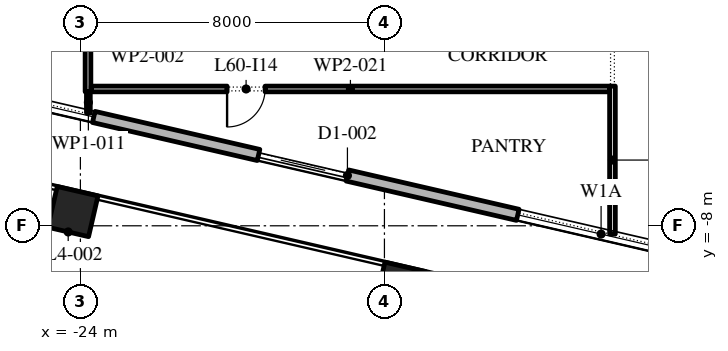
"""IFC4 building model, lengths in metres.
Left out: names, types, materials, properties, quantities, classifications, styles, units other than length and angle.
Written with IfcOpenShell. Run it as: python <this file> out.ifc"""

import sys

from ifc_helpers import new_model, si_unit, direction, frame, frame_2d, origin, origin_2d, place, context, subcontext, project, spatial, rectangle, extrude, element, fill, save


model = new_model("IFC4")
c1 = context("Model", 3, precision=1e-05, world=origin(), true_north=direction((0.0, 1.0)))
c2 = subcontext(c1, "Body", "Model", "MODEL_VIEW")
j1 = project(units=[si_unit("LENGTHUNIT", "METRE"), si_unit("PLANEANGLEUNIT", "RADIAN")], contexts=[c1])
p1 = place(None, origin())
s1 = spatial("IfcSite", under=j1, at=p1, CompositionType="ELEMENT")
p2 = place(p1, origin())
s2 = spatial("IfcBuilding", under=s1, at=p2, CompositionType="ELEMENT")
p3 = place(p2, frame((0.0, 0.0, 276.6)))
s3 = spatial("IfcBuildingStorey", under=s2, at=p3, CompositionType="ELEMENT", Elevation=276.6)
for number, where, z_axis, x_axis in (
    (1, (-24.197, -7.626, 0.0), (0.0, 0.0, 1.0), (0.974, -0.225, 0.0)),
    (2, (-15.574, -9.617, 0.0), (0.0, 0.0, 1.0), (0.974, -0.225, 0.0)),
):
    element("IfcColumn", number, at=place(p3, frame(where, z_axis=z_axis, x_axis=x_axis)), inside=s3, PredefinedType="COLUMN", context=c2, shape_type="SweptSolid", body=[
        extrude(rectangle(XDim=1.1, YDim=1.1, at=origin_2d()), origin(), (0.0, 0.0, 1.0), 4.2),
    ])
p4 = place(p3, frame((-29.616, -3.758, 0.0), z_axis=(0.0, 0.0, 1.0), x_axis=(0.974370532314, -0.224949029246, 0.0)))
e3 = element("IfcWall", 3, at=p4, inside=s3, PredefinedType="STANDARD", context=c2, shape_type="SweptSolid", body=[
    extrude(rectangle(XDim=48.0, YDim=0.3, at=frame_2d((24.0, 0.0))), origin(), (0.0, 0.0, 1.0), 4.0),
])
p5 = place(p4, frame((1.625, 0.0, 0.45)))
e4 = element("IfcOpeningElement", 4, at=p5, cuts=e3, PredefinedType="OPENING", context=c2, shape_type="SweptSolid", body=[
    extrude(rectangle(XDim=4.5, YDim=3.05, at=frame_2d((2.25, 1.525))), frame((0.0, 0.16, 0.0), z_axis=(0.0, -1.0, 0.0), x_axis=(1.0, 0.0, 0.0)), (0.0, 0.0, 1.0), 0.32),
])
p6 = place(p4, frame((10.575, 0.0, 0.0)))
e5 = element("IfcOpeningElement", 5, at=p6, cuts=e3, PredefinedType="OPENING", context=c2, shape_type="SweptSolid", body=[
    extrude(rectangle(XDim=2.4, YDim=3.5, at=frame_2d((1.2, 1.75))), frame((0.0, 0.16, 0.0), z_axis=(0.0, -1.0, 0.0), x_axis=(1.0, 0.0, 0.0)), (0.0, 0.0, 1.0), 0.32),
])
p7 = place(p4, frame((17.575, 0.0, 0.45)))
e6 = element("IfcOpeningElement", 6, at=p7, cuts=e3, PredefinedType="OPENING", context=c2, shape_type="SweptSolid", body=[
    extrude(rectangle(XDim=4.5, YDim=3.0, at=frame_2d((2.25, 1.5))), frame((0.0, 0.16, 0.0), z_axis=(0.0, -1.0, 0.0), x_axis=(1.0, 0.0, 0.0)), (0.0, 0.0, 1.0), 0.32),
])
p8 = place(p4, frame((25.625, 0.0, 0.45)))
e7 = element("IfcOpeningElement", 7, at=p8, cuts=e3, PredefinedType="OPENING", context=c2, shape_type="SweptSolid", body=[
    extrude(rectangle(XDim=4.5, YDim=2.95, at=frame_2d((2.25, 1.475))), frame((0.0, 0.16, 0.0), z_axis=(0.0, -1.0, 0.0), x_axis=(1.0, 0.0, 0.0)), (0.0, 0.0, 1.0), 0.32),
])
p9 = place(p4, frame((33.675, 0.0, 0.45)))
e8 = element("IfcOpeningElement", 8, at=p9, cuts=e3, PredefinedType="OPENING", context=c2, shape_type="SweptSolid", body=[
    extrude(rectangle(XDim=4.5, YDim=2.825, at=frame_2d((2.25, 1.413))), frame((0.0, 0.16, 0.0), z_axis=(0.0, -1.0, 0.0), x_axis=(1.0, 0.0, 0.0)), (0.0, 0.0, 1.0), 0.32),
])
p10 = place(p4, frame((42.175, 0.0, 0.0)))
e9 = element("IfcOpeningElement", 9, at=p10, cuts=e3, PredefinedType="OPENING", context=c2, shape_type="SweptSolid", body=[
    extrude(rectangle(XDim=2.4, YDim=3.5, at=frame_2d((1.2, 1.75))), frame((0.0, 0.16, 0.0), z_axis=(0.0, -1.0, 0.0), x_axis=(1.0, 0.0, 0.0)), (0.0, 0.0, 1.0), 0.32),
])
p11 = place(p3, frame((-23.8, -4.475, 0.0), z_axis=(0.0, 0.0, 1.0), x_axis=(0.0, 1.0, 0.0)))
e10 = element("IfcWall", 10, at=p11, inside=s3, PredefinedType="PARTITIONING", context=c2, shape_type="SweptSolid", body=[
    extrude(rectangle(XDim=4.935, YDim=0.15, at=frame_2d((2.468, 0.0))), origin(), (0.0, 0.0, 1.0), 4.0),
])
p12 = place(p11, frame((1.485, 0.0, 0.0)))
e11 = element("IfcOpeningElement", 11, at=p12, cuts=e10, PredefinedType="OPENING", context=c2, shape_type="SweptSolid", body=[
    extrude(rectangle(XDim=1.0, YDim=2.1, at=frame_2d((0.5, 1.05))), frame((0.0, 0.085, 0.0), z_axis=(0.0, -1.0, 0.0), x_axis=(1.0, 0.0, 0.0)), (0.0, 0.0, 1.0), 0.17),
])
p13 = place(p3, frame((-23.79, -5.032, 0.0), z_axis=(0.0, 0.0, 1.0), x_axis=(0.0, 1.0, 0.0)))
e12 = element("IfcWall", 12, at=p13, inside=s3, PredefinedType="PARTITIONING", context=c2, shape_type="SweptSolid", body=[
    extrude(rectangle(XDim=0.557, YDim=0.1, at=frame_2d((0.278, 0.0))), origin(), (0.0, 0.0, 1.0), 4.0),
])
p14 = place(p3, frame((-10.0, -8.216, 0.0), z_axis=(0.0, 0.0, 1.0), x_axis=(0.0, 1.0, 0.0)))
e13 = element("IfcWall", 13, at=p14, inside=s3, PredefinedType="PARTITIONING", context=c2, shape_type="SweptSolid", body=[
    extrude(rectangle(XDim=3.891, YDim=0.15, at=frame_2d((1.946, 0.0))), origin(), (0.0, 0.0, 1.0), 4.0),
])
p15 = place(p3, frame((-10.075, -4.4, 0.0), z_axis=(0.0, 0.0, 1.0), x_axis=(-1.0, 0.0, 0.0)))
e14 = element("IfcWall", 14, at=p15, inside=s3, PredefinedType="PARTITIONING", context=c2, shape_type="SweptSolid", body=[
    extrude(rectangle(XDim=13.64, YDim=0.15, at=frame_2d((6.82, 0.0))), origin(), (0.0, 0.0, 1.0), 4.0),
])
p16 = place(p15, frame((9.065, 0.0, 0.0)))
e15 = element("IfcOpeningElement", 15, at=p16, cuts=e14, PredefinedType="OPENING", context=c2, shape_type="SweptSolid", body=[
    extrude(rectangle(XDim=1.0, YDim=2.1, at=frame_2d((0.5, 1.05))), frame((0.0, 0.085, 0.0), z_axis=(0.0, -1.0, 0.0), x_axis=(1.0, 0.0, 0.0)), (0.0, 0.0, 1.0), 0.17),
])
p17 = place(p5, origin())
e16 = element("IfcWindow", 16, at=p17, inside=s3, PartitioningType="DOUBLE_PANEL_VERTICAL", PredefinedType="WINDOW", context=c2, shape_type="SweptSolid", body=[
    extrude(rectangle(XDim=4.5, YDim=3.05, at=frame_2d((2.25, 1.525))), frame((0.0, 0.03, 0.0), z_axis=(0.0, -1.0, 0.0), x_axis=(1.0, 0.0, 0.0)), (0.0, 0.0, 1.0), 0.06),
])
fill(e4, e16)
p18 = place(p6, origin())
e17 = element("IfcDoor", 17, at=p18, inside=s3, OperationType="DOUBLE_DOOR_SLIDING", PredefinedType="DOOR", context=c2, shape_type="SweptSolid", body=[
    extrude(rectangle(XDim=2.4, YDim=3.5, at=frame_2d((1.2, 1.75))), frame((0.0, 0.025, 0.0), z_axis=(0.0, -1.0, 0.0), x_axis=(1.0, 0.0, 0.0)), (0.0, 0.0, 1.0), 0.05),
])
fill(e5, e17)
p19 = place(p7, origin())
e18 = element("IfcWindow", 18, at=p19, inside=s3, PartitioningType="DOUBLE_PANEL_VERTICAL", PredefinedType="WINDOW", context=c2, shape_type="SweptSolid", body=[
    extrude(rectangle(XDim=4.5, YDim=3.0, at=frame_2d((2.25, 1.5))), frame((0.0, 0.03, 0.0), z_axis=(0.0, -1.0, 0.0), x_axis=(1.0, 0.0, 0.0)), (0.0, 0.0, 1.0), 0.06),
])
fill(e6, e18)
p20 = place(p16, origin())
e19 = element("IfcDoor", 19, at=p20, inside=s3, OperationType="SINGLE_SWING_LEFT", PredefinedType="DOOR", context=c2, shape_type="SweptSolid", body=[
    extrude(rectangle(XDim=1.0, YDim=2.1, at=frame_2d((0.5, 1.05))), frame((0.0, 0.025, 0.0), z_axis=(0.0, -1.0, 0.0), x_axis=(1.0, 0.0, 0.0)), (0.0, 0.0, 1.0), 0.05),
])
fill(e15, e19)
save(model, sys.argv[1])
